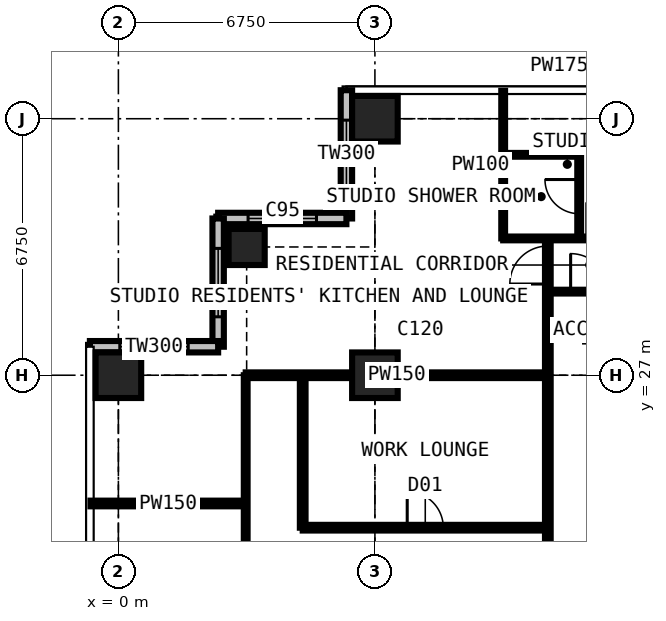
"""IFC4 building model, lengths in metres.
Left out: names, types, materials, properties, quantities, classifications, styles, units other than length and angle.
Written with IfcOpenShell. Run it as: python <this file> out.ifc"""

import sys

from ifc_helpers import new_model, si_unit, direction, frame, frame_2d, origin, origin_2d, place, context, subcontext, project, spatial, rectangle, extrude, element, fill, save


model = new_model("IFC4")
c1 = context("Model", 3, precision=1e-05, world=origin(), true_north=direction((0.0, 1.0)))
c2 = subcontext(c1, "Body", "Model", "MODEL_VIEW")
j1 = project(units=[si_unit("LENGTHUNIT", "METRE"), si_unit("PLANEANGLEUNIT", "RADIAN")], contexts=[c1])
p1 = place(None, origin())
s1 = spatial("IfcSite", under=j1, at=p1, CompositionType="ELEMENT")
p2 = place(p1, origin())
s2 = spatial("IfcBuilding", under=s1, at=p2, CompositionType="ELEMENT")
p3 = place(p2, frame((0.0, 0.0, 189.0)))
s3 = spatial("IfcBuildingStorey", under=s2, at=p3, CompositionType="ELEMENT", Elevation=189.0)
p4 = place(p3, frame((0.0, 27.0, 0.0), z_axis=(0.0, 0.0, 1.0), x_axis=(1.0, 0.0, 0.0)))
e1 = element("IfcColumn", 1, at=p4, inside=s3, PredefinedType="COLUMN", context=c2, shape_type="SweptSolid", body=[
    extrude(rectangle(XDim=1.2, YDim=1.2, at=origin_2d()), origin(), (0.0, 0.0, 1.0), 3.6),
])
p5 = place(p3, frame((3.375, 30.375, 0.0), z_axis=(0.0, 0.0, 1.0), x_axis=(1.0, 0.0, 0.0)))
e2 = element("IfcColumn", 2, at=p5, inside=s3, PredefinedType="COLUMN", context=c2, shape_type="SweptSolid", body=[
    extrude(rectangle(XDim=0.95, YDim=0.95, at=origin_2d()), origin(), (0.0, 0.0, 1.0), 3.6),
])
for number, where, z_axis, x_axis in (
    (3, (6.75, 27.0, 0.0), (0.0, 0.0, 1.0), (1.0, 0.0, 0.0)),
    (4, (6.75, 33.75, 0.0), (0.0, 0.0, 1.0), (1.0, 0.0, 0.0)),
):
    element("IfcColumn", number, at=place(p3, frame(where, z_axis=z_axis, x_axis=x_axis)), inside=s3, PredefinedType="COLUMN", context=c2, shape_type="SweptSolid", body=[
        extrude(rectangle(XDim=1.2, YDim=1.2, at=origin_2d()), origin(), (0.0, 0.0, 1.0), 3.6),
    ])
p6 = place(p3, frame((6.0, 34.5, 0.0), z_axis=(0.0, 0.0, 1.0), x_axis=(0.0, -1.0, 0.0)))
e5 = element("IfcWall", 5, at=p6, inside=s3, PredefinedType="SOLIDWALL", context=c2, shape_type="SweptSolid", body=[
    extrude(rectangle(XDim=3.375, YDim=0.3, at=frame_2d((1.688, 0.0))), origin(), (0.0, 0.0, 1.0), 3.375),
])
p7 = place(p6, frame((0.788, 0.0, 0.6)))
e6 = element("IfcOpeningElement", 6, at=p7, cuts=e5, PredefinedType="OPENING", context=c2, shape_type="SweptSolid", body=[
    extrude(rectangle(XDim=1.8, YDim=2.1, at=frame_2d((0.9, 1.05))), frame((0.0, 0.16, 0.0), z_axis=(0.0, -1.0, 0.0), x_axis=(1.0, 0.0, 0.0)), (0.0, 0.0, 1.0), 0.32),
])
p8 = place(p3, frame((6.0, 31.125, 0.0), z_axis=(0.0, 0.0, 1.0), x_axis=(-1.0, 0.0, 0.0)))
e7 = element("IfcWall", 7, at=p8, inside=s3, PredefinedType="SOLIDWALL", context=c2, shape_type="SweptSolid", body=[
    extrude(rectangle(XDim=3.375, YDim=0.3, at=frame_2d((1.688, 0.0))), origin(), (0.0, 0.0, 1.0), 3.375),
])
p9 = place(p8, frame((0.788, 0.0, 0.6)))
e8 = element("IfcOpeningElement", 8, at=p9, cuts=e7, PredefinedType="OPENING", context=c2, shape_type="SweptSolid", body=[
    extrude(rectangle(XDim=1.8, YDim=2.1, at=frame_2d((0.9, 1.05))), frame((0.0, 0.16, 0.0), z_axis=(0.0, -1.0, 0.0), x_axis=(1.0, 0.0, 0.0)), (0.0, 0.0, 1.0), 0.32),
])
p10 = place(p3, frame((2.625, 31.125, 0.0), z_axis=(0.0, 0.0, 1.0), x_axis=(0.0, -1.0, 0.0)))
e9 = element("IfcWall", 9, at=p10, inside=s3, PredefinedType="SOLIDWALL", context=c2, shape_type="SweptSolid", body=[
    extrude(rectangle(XDim=3.375, YDim=0.3, at=frame_2d((1.688, 0.0))), origin(), (0.0, 0.0, 1.0), 3.375),
])
p11 = place(p10, frame((0.788, 0.0, 0.6)))
e10 = element("IfcOpeningElement", 10, at=p11, cuts=e9, PredefinedType="OPENING", context=c2, shape_type="SweptSolid", body=[
    extrude(rectangle(XDim=1.8, YDim=2.1, at=frame_2d((0.9, 1.05))), frame((0.0, 0.16, 0.0), z_axis=(0.0, -1.0, 0.0), x_axis=(1.0, 0.0, 0.0)), (0.0, 0.0, 1.0), 0.32),
])
p12 = place(p3, frame((2.625, 27.75, 0.0), z_axis=(0.0, 0.0, 1.0), x_axis=(-1.0, 0.0, 0.0)))
e11 = element("IfcWall", 11, at=p12, inside=s3, PredefinedType="SOLIDWALL", context=c2, shape_type="SweptSolid", body=[
    extrude(rectangle(XDim=3.375, YDim=0.3, at=frame_2d((1.688, 0.0))), origin(), (0.0, 0.0, 1.0), 3.375),
])
p13 = place(p12, frame((0.788, 0.0, 0.6)))
e12 = element("IfcOpeningElement", 12, at=p13, cuts=e11, PredefinedType="OPENING", context=c2, shape_type="SweptSolid", body=[
    extrude(rectangle(XDim=1.8, YDim=2.1, at=frame_2d((0.9, 1.05))), frame((0.0, 0.16, 0.0), z_axis=(0.0, -1.0, 0.0), x_axis=(1.0, 0.0, 0.0)), (0.0, 0.0, 1.0), 0.32),
])
p14 = place(p3, frame((-0.734, 23.625, 0.0), z_axis=(0.0, 0.0, 1.0), x_axis=(1.0, 0.0, 0.0)))
e13 = element("IfcWall", 13, at=p14, inside=s3, PredefinedType="PARTITIONING", context=c2, shape_type="SweptSolid", body=[
    extrude(rectangle(XDim=4.084, YDim=0.15, at=frame_2d((2.042, 0.0))), origin(), (0.0, 0.0, 1.0), 3.375),
])
p15 = place(p3, frame((3.35, 10.125, 0.0), z_axis=(0.0, 0.0, 1.0), x_axis=(0.0, 1.0, 0.0)))
e14 = element("IfcWall", 14, at=p15, inside=s3, PredefinedType="PARTITIONING", context=c2, shape_type="SweptSolid", body=[
    extrude(rectangle(XDim=16.875, YDim=0.1, at=frame_2d((8.438, 0.0))), origin(), (0.0, 0.0, 1.0), 3.375),
])
p16 = place(p15, frame((4.2, 0.0, 0.0)))
e15 = element("IfcOpeningElement", 15, at=p16, cuts=e14, PredefinedType="OPENING", context=c2, shape_type="SweptSolid", body=[
    extrude(rectangle(XDim=0.95, YDim=2.2, at=frame_2d((0.475, 1.1))), frame((0.0, 0.06, 0.0), z_axis=(0.0, -1.0, 0.0), x_axis=(1.0, 0.0, 0.0)), (0.0, 0.0, 1.0), 0.12),
])
p17 = place(p15, frame((10.95, 0.0, 0.0)))
e16 = element("IfcOpeningElement", 16, at=p17, cuts=e14, PredefinedType="OPENING", context=c2, shape_type="SweptSolid", body=[
    extrude(rectangle(XDim=0.95, YDim=2.2, at=frame_2d((0.475, 1.1))), frame((0.0, 0.06, 0.0), z_axis=(0.0, -1.0, 0.0), x_axis=(1.0, 0.0, 0.0)), (0.0, 0.0, 1.0), 0.12),
])
p18 = place(p3, frame((3.35, 27.0, 0.0), z_axis=(0.0, 0.0, 1.0), x_axis=(1.0, 0.0, 0.0)))
e17 = element("IfcWall", 17, at=p18, inside=s3, PredefinedType="PARTITIONING", context=c2, shape_type="SweptSolid", body=[
    extrude(rectangle(XDim=7.95, YDim=0.15, at=frame_2d((3.975, 0.0))), origin(), (0.0, 0.0, 1.0), 2.806),
])
p19 = place(p3, frame((4.85, 22.988, 0.0), z_axis=(0.0, 0.0, 1.0), x_axis=(0.0, 1.0, 0.0)))
e18 = element("IfcWall", 18, at=p19, inside=s3, PredefinedType="PARTITIONING", context=c2, shape_type="SweptSolid", body=[
    extrude(rectangle(XDim=4.012, YDim=0.15, at=frame_2d((2.006, 0.0))), origin(), (0.0, 0.0, 1.0), 3.375),
])
p20 = place(p3, frame((4.85, 22.988, 0.0), z_axis=(0.0, 0.0, 1.0), x_axis=(1.0, 0.0, 0.0)))
e19 = element("IfcWall", 19, at=p20, inside=s3, PredefinedType="PARTITIONING", context=c2, shape_type="SweptSolid", body=[
    extrude(rectangle(XDim=6.45, YDim=0.15, at=frame_2d((3.225, 0.0))), origin(), (0.0, 0.0, 1.0), 3.375),
])
p21 = place(p20, frame((2.75, 0.0, 0.0)))
e20 = element("IfcOpeningElement", 20, at=p21, cuts=e19, PredefinedType="OPENING", context=c2, shape_type="SweptSolid", body=[
    extrude(rectangle(XDim=0.95, YDim=2.2, at=frame_2d((0.475, 1.1))), frame((0.0, 0.085, 0.0), z_axis=(0.0, -1.0, 0.0), x_axis=(1.0, 0.0, 0.0)), (0.0, 0.0, 1.0), 0.17),
])
p22 = place(p3, frame((10.125, 30.6, 0.0), z_axis=(0.0, 0.0, 1.0), x_axis=(0.0, 1.0, 0.0)))
e21 = element("IfcWall", 21, at=p22, inside=s3, PredefinedType="PARTITIONING", context=c2, shape_type="SweptSolid", body=[
    extrude(rectangle(XDim=3.884, YDim=0.1, at=frame_2d((1.942, 0.0))), origin(), (0.0, 0.0, 1.0), 3.375),
])
p23 = place(p3, frame((10.125, 30.6, 0.0), z_axis=(0.0, 0.0, 1.0), x_axis=(1.0, 0.0, 0.0)))
e22 = element("IfcWall", 22, at=p23, inside=s3, PredefinedType="PARTITIONING", context=c2, shape_type="SweptSolid", body=[
    extrude(rectangle(XDim=3.375, YDim=0.1, at=frame_2d((1.688, 0.0))), origin(), (0.0, 0.0, 1.0), 3.375),
])
p24 = place(p23, frame((2.2, 0.0, 0.0)))
e23 = element("IfcOpeningElement", 23, at=p24, cuts=e22, PredefinedType="OPENING", context=c2, shape_type="SweptSolid", body=[
    extrude(rectangle(XDim=0.95, YDim=2.2, at=frame_2d((0.475, 1.1))), frame((0.0, 0.06, 0.0), z_axis=(0.0, -1.0, 0.0), x_axis=(1.0, 0.0, 0.0)), (0.0, 0.0, 1.0), 0.12),
])
p25 = place(p3, frame((10.125, 32.8, 0.0), z_axis=(0.0, 0.0, 1.0), x_axis=(1.0, 0.0, 0.0)))
e24 = element("IfcWall", 24, at=p25, inside=s3, PredefinedType="PARTITIONING", context=c2, shape_type="SweptSolid", body=[
    extrude(rectangle(XDim=2.0, YDim=0.1, at=frame_2d((1.0, 0.0))), origin(), (0.0, 0.0, 1.0), 3.375),
])
p26 = place(p3, frame((11.3, 11.3, 0.0), z_axis=(0.0, 0.0, 1.0), x_axis=(0.0, 1.0, 0.0)))
e25 = element("IfcWall", 25, at=p26, inside=s3, PredefinedType="PARTITIONING", context=c2, shape_type="SweptSolid", body=[
    extrude(rectangle(XDim=19.3, YDim=0.15, at=frame_2d((9.65, 0.0))), origin(), (0.0, 0.0, 1.0), 3.375),
])
p27 = place(p26, frame((18.1, 0.0, 0.0)))
e26 = element("IfcOpeningElement", 26, at=p27, cuts=e25, PredefinedType="OPENING", context=c2, shape_type="SweptSolid", body=[
    extrude(rectangle(XDim=1.0, YDim=2.2, at=frame_2d((0.5, 1.1))), frame((0.0, 0.085, 0.0), z_axis=(0.0, -1.0, 0.0), x_axis=(1.0, 0.0, 0.0)), (0.0, 0.0, 1.0), 0.17),
])
p28 = place(p26, frame((10.137, 0.0, 0.0)))
e27 = element("IfcOpeningElement", 27, at=p28, cuts=e25, PredefinedType="OPENING", context=c2, shape_type="SweptSolid", body=[
    extrude(rectangle(XDim=1.0, YDim=2.2, at=frame_2d((0.5, 1.1))), frame((0.0, 0.085, 0.0), z_axis=(0.0, -1.0, 0.0), x_axis=(1.0, 0.0, 0.0)), (0.0, 0.0, 1.0), 0.17),
])
p29 = place(p3, frame((11.3, 29.2, 0.0), z_axis=(0.0, 0.0, 1.0), x_axis=(1.0, 0.0, 0.0)))
e28 = element("IfcWall", 28, at=p29, inside=s3, PredefinedType="PARTITIONING", context=c2, shape_type="SweptSolid", body=[
    extrude(rectangle(XDim=19.809, YDim=0.1, at=frame_2d((9.904, 0.0))), origin(), (0.0, 0.0, 1.0), 3.375),
])
p30 = place(p29, frame((16.3, 0.0, 0.0)))
e29 = element("IfcOpeningElement", 29, at=p30, cuts=e28, PredefinedType="OPENING", context=c2, shape_type="SweptSolid", body=[
    extrude(rectangle(XDim=1.0, YDim=2.2, at=frame_2d((0.5, 1.1))), frame((0.0, 0.06, 0.0), z_axis=(0.0, -1.0, 0.0), x_axis=(1.0, 0.0, 0.0)), (0.0, 0.0, 1.0), 0.12),
])
p31 = place(p29, frame((6.4, 0.0, 0.0)))
e30 = element("IfcOpeningElement", 30, at=p31, cuts=e28, PredefinedType="OPENING", context=c2, shape_type="SweptSolid", body=[
    extrude(rectangle(XDim=0.95, YDim=2.2, at=frame_2d((0.475, 1.1))), frame((0.0, 0.06, 0.0), z_axis=(0.0, -1.0, 0.0), x_axis=(1.0, 0.0, 0.0)), (0.0, 0.0, 1.0), 0.12),
])
p32 = place(p29, frame((13.15, 0.0, 0.0)))
e31 = element("IfcOpeningElement", 31, at=p32, cuts=e28, PredefinedType="OPENING", context=c2, shape_type="SweptSolid", body=[
    extrude(rectangle(XDim=0.95, YDim=2.2, at=frame_2d((0.475, 1.1))), frame((0.0, 0.06, 0.0), z_axis=(0.0, -1.0, 0.0), x_axis=(1.0, 0.0, 0.0)), (0.0, 0.0, 1.0), 0.12),
])
p33 = place(p29, frame((0.6, 0.0, 0.0)))
e32 = element("IfcOpeningElement", 32, at=p33, cuts=e28, PredefinedType="OPENING", context=c2, shape_type="SweptSolid", body=[
    extrude(rectangle(XDim=1.0, YDim=2.2, at=frame_2d((0.5, 1.1))), frame((0.0, 0.06, 0.0), z_axis=(0.0, -1.0, 0.0), x_axis=(1.0, 0.0, 0.0)), (0.0, 0.0, 1.0), 0.12),
])
p34 = place(p3, frame((12.125, 30.6, 0.0), z_axis=(0.0, 0.0, 1.0), x_axis=(0.0, 1.0, 0.0)))
e33 = element("IfcWall", 33, at=p34, inside=s3, PredefinedType="PARTITIONING", context=c2, shape_type="SweptSolid", body=[
    extrude(rectangle(XDim=2.2, YDim=0.1, at=frame_2d((1.1, 0.0))), origin(), (0.0, 0.0, 1.0), 3.375),
])
p35 = place(p34, frame((0.65, 0.0, 0.0)))
e34 = element("IfcOpeningElement", 34, at=p35, cuts=e33, PredefinedType="OPENING", context=c2, shape_type="SweptSolid", body=[
    extrude(rectangle(XDim=0.9, YDim=2.2, at=frame_2d((0.45, 1.1))), frame((0.0, 0.06, 0.0), z_axis=(0.0, -1.0, 0.0), x_axis=(1.0, 0.0, 0.0)), (0.0, 0.0, 1.0), 0.12),
])
p36 = place(p7, origin())
e35 = element("IfcWindow", 35, at=p36, inside=s3, PartitioningType="SINGLE_PANEL", PredefinedType="WINDOW", context=c2, shape_type="SweptSolid", body=[
    extrude(rectangle(XDim=1.8, YDim=2.1, at=frame_2d((0.9, 1.05))), frame((0.0, 0.03, 0.0), z_axis=(0.0, -1.0, 0.0), x_axis=(1.0, 0.0, 0.0)), (0.0, 0.0, 1.0), 0.06),
])
fill(e6, e35)
p37 = place(p9, origin())
e36 = element("IfcWindow", 36, at=p37, inside=s3, PartitioningType="SINGLE_PANEL", PredefinedType="WINDOW", context=c2, shape_type="SweptSolid", body=[
    extrude(rectangle(XDim=1.8, YDim=2.1, at=frame_2d((0.9, 1.05))), frame((0.0, 0.03, 0.0), z_axis=(0.0, -1.0, 0.0), x_axis=(1.0, 0.0, 0.0)), (0.0, 0.0, 1.0), 0.06),
])
fill(e8, e36)
p38 = place(p11, origin())
e37 = element("IfcWindow", 37, at=p38, inside=s3, PartitioningType="SINGLE_PANEL", PredefinedType="WINDOW", context=c2, shape_type="SweptSolid", body=[
    extrude(rectangle(XDim=1.8, YDim=2.1, at=frame_2d((0.9, 1.05))), frame((0.0, 0.03, 0.0), z_axis=(0.0, -1.0, 0.0), x_axis=(1.0, 0.0, 0.0)), (0.0, 0.0, 1.0), 0.06),
])
fill(e10, e37)
p39 = place(p13, origin())
e38 = element("IfcWindow", 38, at=p39, inside=s3, PartitioningType="SINGLE_PANEL", PredefinedType="WINDOW", context=c2, shape_type="SweptSolid", body=[
    extrude(rectangle(XDim=1.8, YDim=2.1, at=frame_2d((0.9, 1.05))), frame((0.0, 0.03, 0.0), z_axis=(0.0, -1.0, 0.0), x_axis=(1.0, 0.0, 0.0)), (0.0, 0.0, 1.0), 0.06),
])
fill(e12, e38)
p40 = place(p35, origin())
e39 = element("IfcDoor", 39, at=p40, inside=s3, OperationType="SINGLE_SWING_RIGHT", PredefinedType="DOOR", context=c2, shape_type="SweptSolid", body=[
    extrude(rectangle(XDim=0.9, YDim=2.2, at=frame_2d((0.45, 1.1))), frame((0.0, 0.025, 0.0), z_axis=(0.0, -1.0, 0.0), x_axis=(1.0, 0.0, 0.0)), (0.0, 0.0, 1.0), 0.05),
])
fill(e34, e39)
p41 = place(p33, origin())
e40 = element("IfcDoor", 40, at=p41, inside=s3, OperationType="SINGLE_SWING_LEFT", PredefinedType="DOOR", context=c2, shape_type="SweptSolid", body=[
    extrude(rectangle(XDim=1.0, YDim=2.2, at=frame_2d((0.5, 1.1))), frame((0.0, 0.025, 0.0), z_axis=(0.0, -1.0, 0.0), x_axis=(1.0, 0.0, 0.0)), (0.0, 0.0, 1.0), 0.05),
])
fill(e32, e40)
p42 = place(p27, origin())
e41 = element("IfcDoor", 41, at=p42, inside=s3, OperationType="SINGLE_SWING_LEFT", PredefinedType="DOOR", context=c2, shape_type="SweptSolid", body=[
    extrude(rectangle(XDim=1.0, YDim=2.2, at=frame_2d((0.5, 1.1))), frame((0.0, 0.025, 0.0), z_axis=(0.0, -1.0, 0.0), x_axis=(1.0, 0.0, 0.0)), (0.0, 0.0, 1.0), 0.05),
])
fill(e26, e41)
p43 = place(p21, origin())
e42 = element("IfcDoor", 42, at=p43, inside=s3, OperationType="SINGLE_SWING_LEFT", PredefinedType="DOOR", context=c2, shape_type="SweptSolid", body=[
    extrude(rectangle(XDim=0.95, YDim=2.2, at=frame_2d((0.475, 1.1))), frame((0.0, 0.025, 0.0), z_axis=(0.0, -1.0, 0.0), x_axis=(1.0, 0.0, 0.0)), (0.0, 0.0, 1.0), 0.05),
])
fill(e20, e42)
save(model, sys.argv[1])
